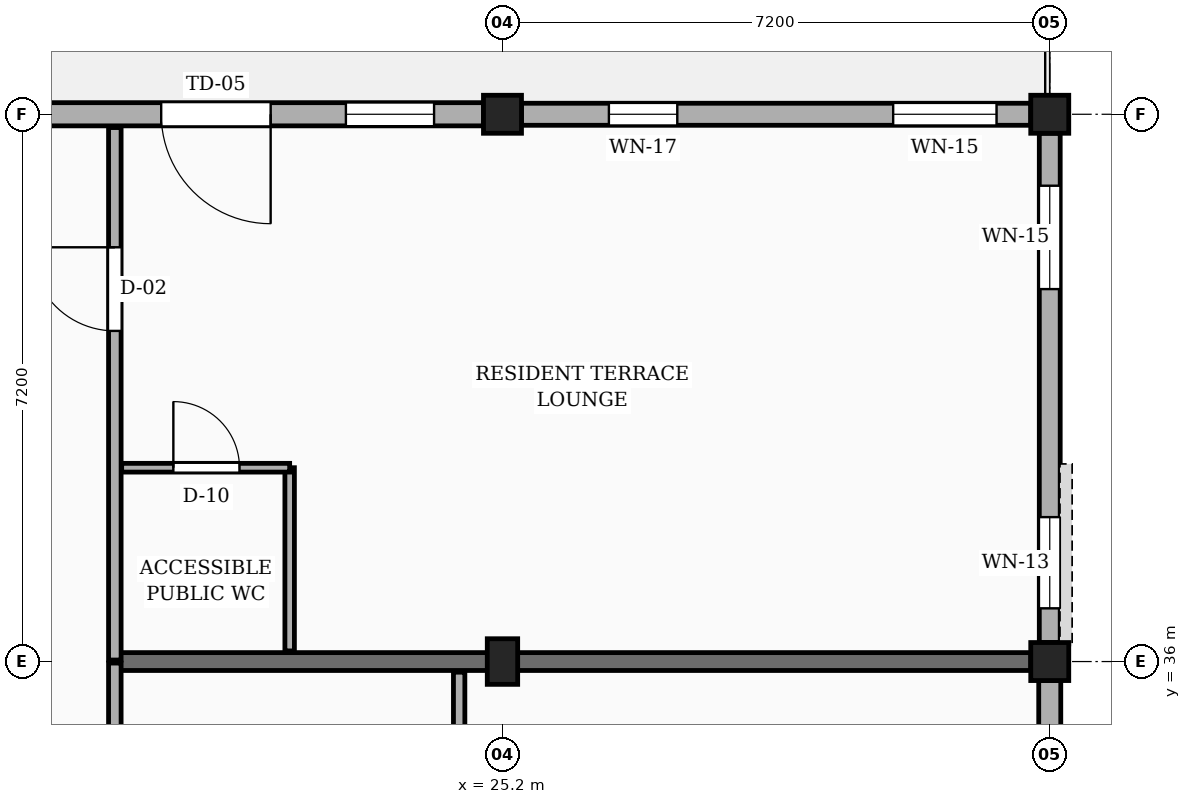
"""IFC4 building model, lengths in metres.
Left out: names, types, materials, properties, quantities, classifications, styles, units other than length and angle.
Written with IfcOpenShell. Run it as: python <this file> out.ifc"""

import sys

from ifc_helpers import new_model, si_unit, direction, frame, frame_2d, origin, origin_2d, place, context, subcontext, project, spatial, rectangle, extrude, element, fill, save


model = new_model("IFC4")
c1 = context("Model", 3, precision=1e-05, world=origin(), true_north=direction((0.0, 1.0)))
c2 = subcontext(c1, "Body", "Model", "MODEL_VIEW")
j1 = project(units=[si_unit("LENGTHUNIT", "METRE"), si_unit("PLANEANGLEUNIT", "RADIAN")], contexts=[c1])
p1 = place(None, origin())
s1 = spatial("IfcSite", under=j1, at=p1, CompositionType="ELEMENT")
p2 = place(p1, origin())
s2 = spatial("IfcBuilding", under=s1, at=p2, CompositionType="ELEMENT")
p3 = place(p2, frame((0.0, 0.0, 23.4)))
s3 = spatial("IfcBuildingStorey", under=s2, at=p3, CompositionType="ELEMENT", Elevation=23.4)
p4 = place(p3, frame((25.2, 36.0, 0.0), z_axis=(0.0, 0.0, 1.0), x_axis=(1.0, 0.0, 0.0)))
e1 = element("IfcColumn", 1, at=p4, inside=s3, PredefinedType="COLUMN", context=c2, shape_type="SweptSolid", body=[
    extrude(rectangle(XDim=0.4, YDim=0.6, at=origin_2d()), origin(), (0.0, 0.0, 1.0), 3.15),
])
for number, where, z_axis, x_axis in (
    (2, (25.2, 43.2, 0.0), (0.0, 0.0, 1.0), (1.0, 0.0, 0.0)),
    (3, (32.4, 36.0, 0.0), (0.0, 0.0, 1.0), (1.0, 0.0, 0.0)),
    (4, (32.4, 43.2, 0.0), (0.0, 0.0, 1.0), (1.0, 0.0, 0.0)),
):
    element("IfcColumn", number, at=place(p3, frame(where, z_axis=z_axis, x_axis=x_axis)), inside=s3, PredefinedType="COLUMN", context=c2, shape_type="SweptSolid", body=[
        extrude(rectangle(XDim=0.5, YDim=0.5, at=origin_2d()), origin(), (0.0, 0.0, 1.0), 3.15),
    ])
p5 = place(p3, frame((20.1, 36.0, 0.0), z_axis=(0.0, 0.0, 1.0), x_axis=(1.0, 0.0, 0.0)))
e5 = element("IfcWall", 5, at=p5, inside=s3, PredefinedType="SOLIDWALL", context=c2, shape_type="SweptSolid", body=[
    extrude(rectangle(XDim=12.05, YDim=0.235, at=frame_2d((6.025, 0.0))), origin(), (0.0, 0.0, 1.0), 2.17),
])
p6 = place(p3, frame((32.4, 29.05, 0.0), z_axis=(0.0, 0.0, 1.0), x_axis=(0.0, 1.0, 0.0)))
e6 = element("IfcWall", 6, at=p6, inside=s3, PredefinedType="SOLIDWALL", context=c2, shape_type="SweptSolid", body=[
    extrude(rectangle(XDim=6.7, YDim=0.29, at=frame_2d((3.35, 0.0))), origin(), (0.0, 0.0, 1.0), 2.44),
])
p7 = place(p6, frame((0.45, 0.0, 0.78)))
e7 = element("IfcOpeningElement", 7, at=p7, cuts=e6, PredefinedType="OPENING", context=c2, shape_type="SweptSolid", body=[
    extrude(rectangle(XDim=1.04, YDim=1.26, at=frame_2d((0.52, 0.63))), frame((0.0, 0.155, 0.0), z_axis=(0.0, -1.0, 0.0), x_axis=(1.0, 0.0, 0.0)), (0.0, 0.0, 1.0), 0.31),
])
p8 = place(p6, frame((4.65, 0.0, 0.78)))
e8 = element("IfcOpeningElement", 8, at=p8, cuts=e6, PredefinedType="OPENING", context=c2, shape_type="SweptSolid", body=[
    extrude(rectangle(XDim=1.2, YDim=1.26, at=frame_2d((0.6, 0.63))), frame((0.0, 0.155, 0.0), z_axis=(0.0, -1.0, 0.0), x_axis=(1.0, 0.0, 0.0)), (0.0, 0.0, 1.0), 0.31),
])
p9 = place(p3, frame((32.4, 36.25, 0.0), z_axis=(0.0, 0.0, 1.0), x_axis=(0.0, 1.0, 0.0)))
e9 = element("IfcWall", 9, at=p9, inside=s3, PredefinedType="SOLIDWALL", context=c2, shape_type="SweptSolid", body=[
    extrude(rectangle(XDim=6.7, YDim=0.275, at=frame_2d((3.35, 0.0))), origin(), (0.0, 0.0, 1.0), 2.44),
])
p10 = place(p9, frame((0.45, 0.0, 0.78)))
e10 = element("IfcOpeningElement", 10, at=p10, cuts=e9, PredefinedType="OPENING", context=c2, shape_type="SweptSolid", body=[
    extrude(rectangle(XDim=1.2, YDim=1.26, at=frame_2d((0.6, 0.63))), frame((0.0, 0.147, 0.0), z_axis=(0.0, -1.0, 0.0), x_axis=(1.0, 0.0, 0.0)), (0.0, 0.0, 1.0), 0.295),
])
p11 = place(p9, frame((4.65, 0.0, 0.78)))
e11 = element("IfcOpeningElement", 11, at=p11, cuts=e9, PredefinedType="OPENING", context=c2, shape_type="SweptSolid", body=[
    extrude(rectangle(XDim=1.36, YDim=1.26, at=frame_2d((0.68, 0.63))), frame((0.0, 0.147, 0.0), z_axis=(0.0, -1.0, 0.0), x_axis=(1.0, 0.0, 0.0)), (0.0, 0.0, 1.0), 0.295),
])
p12 = place(p3, frame((32.15, 43.2, 0.0), z_axis=(0.0, 0.0, 1.0), x_axis=(-1.0, 0.0, 0.0)))
e12 = element("IfcWall", 12, at=p12, inside=s3, PredefinedType="SOLIDWALL", context=c2, shape_type="SweptSolid", body=[
    extrude(rectangle(XDim=6.7, YDim=0.29, at=frame_2d((3.35, 0.0))), origin(), (0.0, 0.0, 1.0), 2.44),
])
p13 = place(p12, frame((0.45, 0.0, 0.78)))
e13 = element("IfcOpeningElement", 13, at=p13, cuts=e12, PredefinedType="OPENING", context=c2, shape_type="SweptSolid", body=[
    extrude(rectangle(XDim=1.36, YDim=1.26, at=frame_2d((0.68, 0.63))), frame((0.0, 0.155, 0.0), z_axis=(0.0, -1.0, 0.0), x_axis=(1.0, 0.0, 0.0)), (0.0, 0.0, 1.0), 0.31),
])
p14 = place(p12, frame((4.65, 0.0, 0.78)))
e14 = element("IfcOpeningElement", 14, at=p14, cuts=e12, PredefinedType="OPENING", context=c2, shape_type="SweptSolid", body=[
    extrude(rectangle(XDim=0.9, YDim=1.36, at=frame_2d((0.45, 0.68))), frame((0.0, 0.155, 0.0), z_axis=(0.0, -1.0, 0.0), x_axis=(1.0, 0.0, 0.0)), (0.0, 0.0, 1.0), 0.31),
])
p15 = place(p3, frame((24.95, 43.2, 0.0), z_axis=(0.0, 0.0, 1.0), x_axis=(-1.0, 0.0, 0.0)))
e15 = element("IfcWall", 15, at=p15, inside=s3, PredefinedType="SOLIDWALL", context=c2, shape_type="SweptSolid", body=[
    extrude(rectangle(XDim=6.7, YDim=0.305, at=frame_2d((3.35, 0.0))), origin(), (0.0, 0.0, 1.0), 2.44),
])
p16 = place(p15, frame((2.8, 0.0, 0.0)))
e16 = element("IfcOpeningElement", 16, at=p16, cuts=e15, PredefinedType="OPENING", context=c2, shape_type="SweptSolid", body=[
    extrude(rectangle(XDim=1.44, YDim=2.12, at=frame_2d((0.72, 1.06))), frame((0.0, 0.163, 0.0), z_axis=(0.0, -1.0, 0.0), x_axis=(1.0, 0.0, 0.0)), (0.0, 0.0, 1.0), 0.325),
])
p17 = place(p15, frame((0.65, 0.0, 0.78)))
e17 = element("IfcOpeningElement", 17, at=p17, cuts=e15, PredefinedType="OPENING", context=c2, shape_type="SweptSolid", body=[
    extrude(rectangle(XDim=1.16, YDim=1.15, at=frame_2d((0.58, 0.575))), frame((0.0, 0.163, 0.0), z_axis=(0.0, -1.0, 0.0), x_axis=(1.0, 0.0, 0.0)), (0.0, 0.0, 1.0), 0.325),
])
p18 = place(p3, frame((20.1, 28.82, 0.0), z_axis=(0.0, 0.0, 1.0), x_axis=(0.0, 1.0, 0.0)))
e18 = element("IfcWall", 18, at=p18, inside=s3, PredefinedType="PARTITIONING", context=c2, shape_type="SweptSolid", body=[
    extrude(rectangle(XDim=7.16, YDim=0.165, at=frame_2d((3.58, 0.0))), origin(), (0.0, 0.0, 1.0), 2.305),
])
p19 = place(p18, frame((4.78, 0.0, 0.0)))
e19 = element("IfcOpeningElement", 19, at=p19, cuts=e18, PredefinedType="OPENING", context=c2, shape_type="SweptSolid", body=[
    extrude(rectangle(XDim=1.14, YDim=2.18, at=frame_2d((0.57, 1.09))), frame((0.0, 0.093, 0.0), z_axis=(0.0, -1.0, 0.0), x_axis=(1.0, 0.0, 0.0)), (0.0, 0.0, 1.0), 0.185),
])
p20 = place(p3, frame((20.1, 36.02, 0.0), z_axis=(0.0, 0.0, 1.0), x_axis=(0.0, 1.0, 0.0)))
e20 = element("IfcWall", 20, at=p20, inside=s3, PredefinedType="PARTITIONING", context=c2, shape_type="SweptSolid", body=[
    extrude(rectangle(XDim=7.005, YDim=0.165, at=frame_2d((3.502, 0.0))), origin(), (0.0, 0.0, 1.0), 2.305),
])
p21 = place(p20, frame((4.33, 0.0, 0.0)))
e21 = element("IfcOpeningElement", 21, at=p21, cuts=e20, PredefinedType="OPENING", context=c2, shape_type="SweptSolid", body=[
    extrude(rectangle(XDim=1.1, YDim=2.15, at=frame_2d((0.55, 1.075))), frame((0.0, 0.093, 0.0), z_axis=(0.0, -1.0, 0.0), x_axis=(1.0, 0.0, 0.0)), (0.0, 0.0, 1.0), 0.185),
])
p22 = place(p3, frame((24.63, 28.94, 0.0), z_axis=(0.0, 0.0, 1.0), x_axis=(0.0, 1.0, 0.0)))
e22 = element("IfcWall", 22, at=p22, inside=s3, PredefinedType="PARTITIONING", context=c2, shape_type="SweptSolid", body=[
    extrude(rectangle(XDim=6.92, YDim=0.15, at=frame_2d((3.46, 0.0))), origin(), (0.0, 0.0, 1.0), 2.305),
])
p23 = place(p22, frame((4.66, 0.0, 0.0)))
e23 = element("IfcOpeningElement", 23, at=p23, cuts=e22, PredefinedType="OPENING", context=c2, shape_type="SweptSolid", body=[
    extrude(rectangle(XDim=0.92, YDim=2.1, at=frame_2d((0.46, 1.05))), frame((0.0, 0.085, 0.0), z_axis=(0.0, -1.0, 0.0), x_axis=(1.0, 0.0, 0.0)), (0.0, 0.0, 1.0), 0.17),
])
p24 = place(p3, frame((22.4, 36.14, 0.0), z_axis=(0.0, 0.0, 1.0), x_axis=(0.0, 1.0, 0.0)))
e24 = element("IfcWall", 24, at=p24, inside=s3, PredefinedType="PARTITIONING", context=c2, shape_type="SweptSolid", body=[
    extrude(rectangle(XDim=2.41, YDim=0.125, at=frame_2d((1.205, 0.0))), origin(), (0.0, 0.0, 1.0), 2.305),
])
p25 = place(p3, frame((20.19, 38.55, 0.0), z_axis=(0.0, 0.0, 1.0), x_axis=(1.0, 0.0, 0.0)))
e25 = element("IfcWall", 25, at=p25, inside=s3, PredefinedType="PARTITIONING", context=c2, shape_type="SweptSolid", body=[
    extrude(rectangle(XDim=2.21, YDim=0.115, at=frame_2d((1.105, 0.0))), origin(), (0.0, 0.0, 1.0), 2.305),
])
p26 = place(p25, frame((0.68, 0.0, 0.0)))
e26 = element("IfcOpeningElement", 26, at=p26, cuts=e25, PredefinedType="OPENING", context=c2, shape_type="SweptSolid", body=[
    extrude(rectangle(XDim=0.87, YDim=2.05, at=frame_2d((0.435, 1.025))), frame((0.0, 0.067, 0.0), z_axis=(0.0, -1.0, 0.0), x_axis=(1.0, 0.0, 0.0)), (0.0, 0.0, 1.0), 0.135),
])
p27 = place(p10, origin())
e27 = element("IfcWindow", 27, at=p27, inside=s3, PartitioningType="SINGLE_PANEL", PredefinedType="WINDOW", context=c2, shape_type="SweptSolid", body=[
    extrude(rectangle(XDim=1.2, YDim=1.26, at=frame_2d((0.6, 0.63))), frame((0.0, 0.03, 0.0), z_axis=(0.0, -1.0, 0.0), x_axis=(1.0, 0.0, 0.0)), (0.0, 0.0, 1.0), 0.06),
])
fill(e10, e27)
p28 = place(p11, origin())
e28 = element("IfcWindow", 28, at=p28, inside=s3, PartitioningType="SINGLE_PANEL", PredefinedType="WINDOW", context=c2, shape_type="SweptSolid", body=[
    extrude(rectangle(XDim=1.36, YDim=1.26, at=frame_2d((0.68, 0.63))), frame((0.0, 0.03, 0.0), z_axis=(0.0, -1.0, 0.0), x_axis=(1.0, 0.0, 0.0)), (0.0, 0.0, 1.0), 0.06),
])
fill(e11, e28)
p29 = place(p13, origin())
e29 = element("IfcWindow", 29, at=p29, inside=s3, PartitioningType="SINGLE_PANEL", PredefinedType="WINDOW", context=c2, shape_type="SweptSolid", body=[
    extrude(rectangle(XDim=1.36, YDim=1.26, at=frame_2d((0.68, 0.63))), frame((0.0, 0.03, 0.0), z_axis=(0.0, -1.0, 0.0), x_axis=(1.0, 0.0, 0.0)), (0.0, 0.0, 1.0), 0.06),
])
fill(e13, e29)
p30 = place(p14, origin())
e30 = element("IfcWindow", 30, at=p30, inside=s3, PartitioningType="SINGLE_PANEL", PredefinedType="WINDOW", context=c2, shape_type="SweptSolid", body=[
    extrude(rectangle(XDim=0.9, YDim=1.36, at=frame_2d((0.45, 0.68))), frame((0.0, 0.03, 0.0), z_axis=(0.0, -1.0, 0.0), x_axis=(1.0, 0.0, 0.0)), (0.0, 0.0, 1.0), 0.06),
])
fill(e14, e30)
p31 = place(p16, frame((1.44, 0.0, 0.0), z_axis=(0.0, 0.0, 1.0), x_axis=(-1.0, 0.0, 0.0)))
e31 = element("IfcDoor", 31, at=p31, inside=s3, OperationType="SINGLE_SWING_LEFT", PredefinedType="DOOR", context=c2, shape_type="SweptSolid", body=[
    extrude(rectangle(XDim=1.44, YDim=2.12, at=frame_2d((0.72, 1.06))), frame((0.0, 0.025, 0.0), z_axis=(0.0, -1.0, 0.0), x_axis=(1.0, 0.0, 0.0)), (0.0, 0.0, 1.0), 0.05),
])
fill(e16, e31)
p32 = place(p17, origin())
e32 = element("IfcWindow", 32, at=p32, inside=s3, PartitioningType="SINGLE_PANEL", PredefinedType="WINDOW", context=c2, shape_type="SweptSolid", body=[
    extrude(rectangle(XDim=1.16, YDim=1.15, at=frame_2d((0.58, 0.575))), frame((0.0, 0.03, 0.0), z_axis=(0.0, -1.0, 0.0), x_axis=(1.0, 0.0, 0.0)), (0.0, 0.0, 1.0), 0.06),
])
fill(e17, e32)
p33 = place(p21, origin())
e33 = element("IfcDoor", 33, at=p33, inside=s3, OperationType="SINGLE_SWING_RIGHT", PredefinedType="DOOR", context=c2, shape_type="SweptSolid", body=[
    extrude(rectangle(XDim=1.1, YDim=2.15, at=frame_2d((0.55, 1.075))), frame((0.0, 0.025, 0.0), z_axis=(0.0, -1.0, 0.0), x_axis=(1.0, 0.0, 0.0)), (0.0, 0.0, 1.0), 0.05),
])
fill(e21, e33)
p34 = place(p26, origin())
e34 = element("IfcDoor", 34, at=p34, inside=s3, OperationType="SINGLE_SWING_LEFT", PredefinedType="DOOR", context=c2, shape_type="SweptSolid", body=[
    extrude(rectangle(XDim=0.87, YDim=2.05, at=frame_2d((0.435, 1.025))), frame((0.0, 0.025, 0.0), z_axis=(0.0, -1.0, 0.0), x_axis=(1.0, 0.0, 0.0)), (0.0, 0.0, 1.0), 0.05),
])
fill(e26, e34)
save(model, sys.argv[1])
